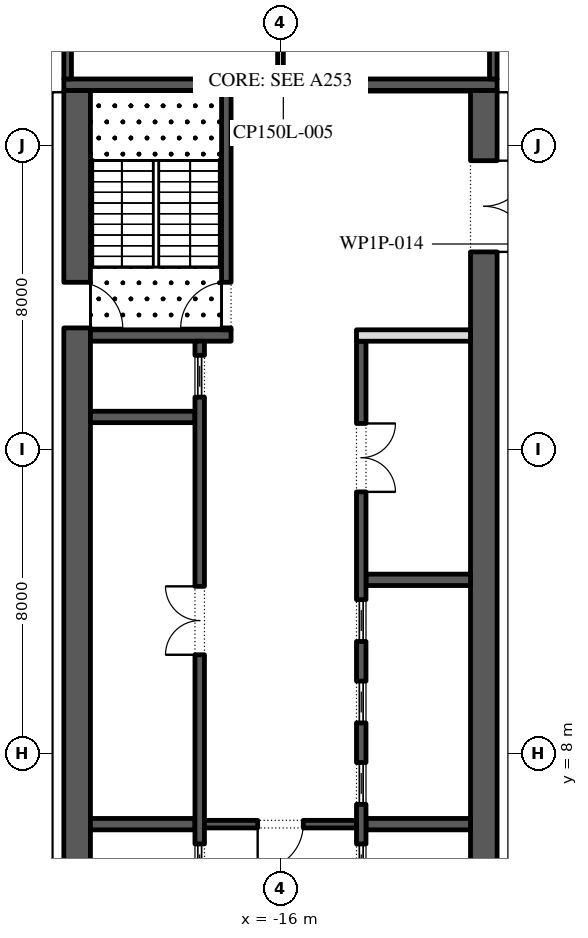
"""IFC4 building model, lengths in metres.
Left out: names, types, materials, properties, quantities, classifications, styles, units other than length and angle.
Written with IfcOpenShell. Run it as: python <this file> out.ifc"""

import sys

from ifc_helpers import new_model, si_unit, direction, frame, frame_2d, origin, place, context, subcontext, project, spatial, rectangle, extrude, element, fill, save


model = new_model("IFC4")
c1 = context("Model", 3, precision=1e-05, world=origin(), true_north=direction((0.0, 1.0)))
c2 = subcontext(c1, "Body", "Model", "MODEL_VIEW")
j1 = project(units=[si_unit("LENGTHUNIT", "METRE"), si_unit("PLANEANGLEUNIT", "RADIAN")], contexts=[c1])
p1 = place(None, origin())
s1 = spatial("IfcSite", under=j1, at=p1, CompositionType="ELEMENT")
p2 = place(p1, origin())
s2 = spatial("IfcBuilding", under=s1, at=p2, CompositionType="ELEMENT")
p3 = place(p2, frame((0.0, 0.0, 226.2)))
s3 = spatial("IfcBuildingStorey", under=s2, at=p3, CompositionType="ELEMENT", Elevation=226.2)
p4 = place(p3, frame((-21.35, -2.45, 0.0), z_axis=(0.0, 0.0, 1.0), x_axis=(0.0, 1.0, 0.0)))
e1 = element("IfcWall", 1, at=p4, inside=s3, PredefinedType="SHEAR", context=c2, shape_type="SweptSolid", body=[
    extrude(rectangle(XDim=27.9, YDim=0.7, at=frame_2d((13.95, 0.0))), origin(), (0.0, 0.0, 1.0), 10.35),
])
p5 = place(p4, frame((5.05, 0.0, 0.0)))
e2 = element("IfcOpeningElement", 2, at=p5, cuts=e1, PredefinedType="OPENING", context=c2, shape_type="SweptSolid", body=[
    extrude(rectangle(XDim=1.2, YDim=2.1, at=frame_2d((0.6, 1.05))), frame((0.0, 0.36, 0.0), z_axis=(0.0, -1.0, 0.0), x_axis=(1.0, 0.0, 0.0)), (0.0, 0.0, 1.0), 0.72),
])
p6 = place(p4, frame((21.65, 0.0, 0.0)))
e3 = element("IfcOpeningElement", 3, at=p6, cuts=e1, PredefinedType="OPENING", context=c2, shape_type="SweptSolid", body=[
    extrude(rectangle(XDim=1.2, YDim=2.1, at=frame_2d((0.6, 1.05))), frame((0.0, 0.36, 0.0), z_axis=(0.0, -1.0, 0.0), x_axis=(1.0, 0.0, 0.0)), (0.0, 0.0, 1.0), 0.72),
])
p7 = place(p3, frame((-10.65, -2.45, 0.0), z_axis=(0.0, 0.0, 1.0), x_axis=(0.0, 1.0, 0.0)))
e4 = element("IfcWall", 4, at=p7, inside=s3, PredefinedType="SHEAR", context=c2, shape_type="SweptSolid", body=[
    extrude(rectangle(XDim=27.9, YDim=0.7, at=frame_2d((13.95, 0.0))), origin(), (0.0, 0.0, 1.0), 10.35),
])
p8 = place(p7, frame((23.65, 0.0, 0.0)))
e5 = element("IfcOpeningElement", 5, at=p8, cuts=e4, PredefinedType="OPENING", context=c2, shape_type="SweptSolid", body=[
    extrude(rectangle(XDim=2.4, YDim=2.1, at=frame_2d((1.2, 1.05))), frame((0.0, 0.36, 0.0), z_axis=(0.0, -1.0, 0.0), x_axis=(1.0, 0.0, 0.0)), (0.0, 0.0, 1.0), 0.72),
])
p9 = place(p7, frame((2.25, 0.0, 0.0)))
e6 = element("IfcOpeningElement", 6, at=p9, cuts=e4, PredefinedType="OPENING", context=c2, shape_type="SweptSolid", body=[
    extrude(rectangle(XDim=1.8, YDim=2.4, at=frame_2d((0.9, 1.2))), frame((0.0, 0.36, 0.0), z_axis=(0.0, -1.0, 0.0), x_axis=(1.0, 0.0, 0.0)), (0.0, 0.0, 1.0), 0.72),
])
p10 = place(p3, frame((-21.7, 25.6, 0.0), z_axis=(0.0, 0.0, 1.0), x_axis=(1.0, 0.0, 0.0)))
e7 = element("IfcWall", 7, at=p10, inside=s3, PredefinedType="SHEAR", context=c2, shape_type="SweptSolid", body=[
    extrude(rectangle(XDim=11.4, YDim=0.3, at=frame_2d((5.7, 0.0))), origin(), (0.0, 0.0, 1.0), 10.35),
])
p11 = place(p3, frame((-21.0, 19.0, 0.0), z_axis=(0.0, 0.0, 1.0), x_axis=(1.0, 0.0, 0.0)))
e8 = element("IfcWall", 8, at=p11, inside=s3, PredefinedType="SHEAR", context=c2, shape_type="SweptSolid", body=[
    extrude(rectangle(XDim=3.7, YDim=0.3, at=frame_2d((1.85, 0.0))), origin(), (0.0, 0.0, 1.0), 10.35),
])
p12 = place(p3, frame((-17.425, 19.15, 0.0), z_axis=(0.0, 0.0, 1.0), x_axis=(0.0, 1.0, 0.0)))
e9 = element("IfcWall", 9, at=p12, inside=s3, PredefinedType="SHEAR", context=c2, shape_type="SweptSolid", body=[
    extrude(rectangle(XDim=6.3, YDim=0.25, at=frame_2d((3.15, 0.0))), origin(), (0.0, 0.0, 1.0), 10.35),
])
p13 = place(p12, frame((0.05, 0.0, 0.0)))
e10 = element("IfcOpeningElement", 10, at=p13, cuts=e9, PredefinedType="OPENING", context=c2, shape_type="SweptSolid", body=[
    extrude(rectangle(XDim=1.2, YDim=2.1, at=frame_2d((0.6, 1.05))), frame((0.0, 0.135, 0.0), z_axis=(0.0, -1.0, 0.0), x_axis=(1.0, 0.0, 0.0)), (0.0, 0.0, 1.0), 0.27),
])
for number, where, z_axis, x_axis in (
    (11, (-21.0, 6.143, 0.0), (0.0, 0.0, 1.0), (1.0, 0.0, 0.0)),
    (12, (-21.0, 16.857, 0.0), (0.0, 0.0, 1.0), (1.0, 0.0, 0.0)),
):
    element("IfcWall", number, at=place(p3, frame(where, z_axis=z_axis, x_axis=x_axis)), inside=s3, PredefinedType="SHEAR", context=c2, shape_type="SweptSolid", body=[
        extrude(rectangle(XDim=2.75, YDim=0.3, at=frame_2d((1.375, 0.0))), origin(), (0.0, 0.0, 1.0), 10.35),
    ])
p14 = place(p3, frame((-18.125, 4.15, 0.0), z_axis=(0.0, 0.0, 1.0), x_axis=(0.0, 1.0, 0.0)))
e13 = element("IfcWall", 13, at=p14, inside=s3, PredefinedType="SHEAR", context=c2, shape_type="SweptSolid", body=[
    extrude(rectangle(XDim=14.7, YDim=0.25, at=frame_2d((7.35, 0.0))), origin(), (0.0, 0.0, 1.0), 10.35),
])
p15 = place(p14, frame((6.45, 0.0, 0.0)))
e14 = element("IfcOpeningElement", 14, at=p15, cuts=e13, PredefinedType="OPENING", context=c2, shape_type="SweptSolid", body=[
    extrude(rectangle(XDim=1.8, YDim=2.4, at=frame_2d((0.9, 1.2))), frame((0.0, 0.135, 0.0), z_axis=(0.0, -1.0, 0.0), x_axis=(1.0, 0.0, 0.0)), (0.0, 0.0, 1.0), 0.27),
])
p16 = place(p14, frame((0.371, 0.0, 0.0)))
e15 = element("IfcOpeningElement", 15, at=p16, cuts=e13, PredefinedType="OPENING", context=c2, shape_type="SweptSolid", body=[
    extrude(rectangle(XDim=1.1, YDim=2.1, at=frame_2d((0.55, 1.05))), frame((0.0, 0.135, 0.0), z_axis=(0.0, -1.0, 0.0), x_axis=(1.0, 0.0, 0.0)), (0.0, 0.0, 1.0), 0.27),
])
p17 = place(p14, frame((13.229, 0.0, 0.0)))
e16 = element("IfcOpeningElement", 16, at=p17, cuts=e13, PredefinedType="OPENING", context=c2, shape_type="SweptSolid", body=[
    extrude(rectangle(XDim=1.1, YDim=2.1, at=frame_2d((0.55, 1.05))), frame((0.0, 0.135, 0.0), z_axis=(0.0, -1.0, 0.0), x_axis=(1.0, 0.0, 0.0)), (0.0, 0.0, 1.0), 0.27),
])
for number, where, z_axis, x_axis in (
    (17, (-13.75, 6.143, 0.0), (0.0, 0.0, 1.0), (1.0, 0.0, 0.0)),
    (18, (-13.75, 12.571, 0.0), (0.0, 0.0, 1.0), (1.0, 0.0, 0.0)),
):
    element("IfcWall", number, at=place(p3, frame(where, z_axis=z_axis, x_axis=x_axis)), inside=s3, PredefinedType="SHEAR", context=c2, shape_type="SweptSolid", body=[
        extrude(rectangle(XDim=2.75, YDim=0.3, at=frame_2d((1.375, 0.0))), origin(), (0.0, 0.0, 1.0), 10.35),
    ])
p18 = place(p3, frame((-13.875, -2.45, 0.0), z_axis=(0.0, 0.0, 1.0), x_axis=(0.0, 1.0, 0.0)))
e19 = element("IfcWall", 19, at=p18, inside=s3, PredefinedType="SHEAR", context=c2, shape_type="SweptSolid", body=[
    extrude(rectangle(XDim=21.3, YDim=0.25, at=frame_2d((10.65, 0.0))), origin(), (0.0, 0.0, 1.0), 10.35),
])
p19 = place(p18, frame((17.336, 0.0, 0.0)))
e20 = element("IfcOpeningElement", 20, at=p19, cuts=e19, PredefinedType="OPENING", context=c2, shape_type="SweptSolid", body=[
    extrude(rectangle(XDim=1.8, YDim=2.4, at=frame_2d((0.9, 1.2))), frame((0.0, 0.135, 0.0), z_axis=(0.0, -1.0, 0.0), x_axis=(1.0, 0.0, 0.0)), (0.0, 0.0, 1.0), 0.27),
])
p20 = place(p18, frame((6.971, 0.0, 0.0)))
e21 = element("IfcOpeningElement", 21, at=p20, cuts=e19, PredefinedType="OPENING", context=c2, shape_type="SweptSolid", body=[
    extrude(rectangle(XDim=1.1, YDim=2.1, at=frame_2d((0.55, 1.05))), frame((0.0, 0.135, 0.0), z_axis=(0.0, -1.0, 0.0), x_axis=(1.0, 0.0, 0.0)), (0.0, 0.0, 1.0), 0.27),
])
p21 = place(p18, frame((9.114, 0.0, 0.0)))
e22 = element("IfcOpeningElement", 22, at=p21, cuts=e19, PredefinedType="OPENING", context=c2, shape_type="SweptSolid", body=[
    extrude(rectangle(XDim=1.1, YDim=2.1, at=frame_2d((0.55, 1.05))), frame((0.0, 0.135, 0.0), z_axis=(0.0, -1.0, 0.0), x_axis=(1.0, 0.0, 0.0)), (0.0, 0.0, 1.0), 0.27),
])
p22 = place(p18, frame((11.257, 0.0, 0.0)))
e23 = element("IfcOpeningElement", 23, at=p22, cuts=e19, PredefinedType="OPENING", context=c2, shape_type="SweptSolid", body=[
    extrude(rectangle(XDim=1.1, YDim=2.1, at=frame_2d((0.55, 1.05))), frame((0.0, 0.135, 0.0), z_axis=(0.0, -1.0, 0.0), x_axis=(1.0, 0.0, 0.0)), (0.0, 0.0, 1.0), 0.27),
])
p23 = place(p18, frame((13.4, 0.0, 0.0)))
e24 = element("IfcOpeningElement", 24, at=p23, cuts=e19, PredefinedType="OPENING", context=c2, shape_type="SweptSolid", body=[
    extrude(rectangle(XDim=1.1, YDim=2.1, at=frame_2d((0.55, 1.05))), frame((0.0, 0.135, 0.0), z_axis=(0.0, -1.0, 0.0), x_axis=(1.0, 0.0, 0.0)), (0.0, 0.0, 1.0), 0.27),
])
p24 = place(p3, frame((-14.0, 19.0, 0.0), z_axis=(0.0, 0.0, 1.0), x_axis=(1.0, 0.0, 0.0)))
e25 = element("IfcWall", 25, at=p24, inside=s3, PredefinedType="PARTITIONING", context=c2, shape_type="SweptSolid", body=[
    extrude(rectangle(XDim=3.0, YDim=0.3, at=frame_2d((1.5, 0.0))), origin(), (0.0, 0.0, 1.0), 10.35),
])
p25 = place(p3, frame((-18.0, 6.143, 0.0), z_axis=(0.0, 0.0, 1.0), x_axis=(1.0, 0.0, 0.0)))
e26 = element("IfcWall", 26, at=p25, inside=s3, PredefinedType="SHEAR", context=c2, shape_type="SweptSolid", body=[
    extrude(rectangle(XDim=4.0, YDim=0.2, at=frame_2d((2.0, 0.0))), origin(), (0.0, 0.0, 1.0), 10.35),
])
p26 = place(p25, frame((1.4, 0.0, 0.0)))
e27 = element("IfcOpeningElement", 27, at=p26, cuts=e26, PredefinedType="OPENING", context=c2, shape_type="SweptSolid", body=[
    extrude(rectangle(XDim=1.2, YDim=2.1, at=frame_2d((0.6, 1.05))), frame((0.0, 0.11, 0.0), z_axis=(0.0, -1.0, 0.0), x_axis=(1.0, 0.0, 0.0)), (0.0, 0.0, 1.0), 0.22),
])
p27 = place(p3, frame((-21.6, 25.75, 0.0), z_axis=(0.0, 0.0, 1.0), x_axis=(0.0, 1.0, 0.0)))
e28 = element("IfcWall", 28, at=p27, inside=s3, PredefinedType="SHEAR", context=c2, shape_type="SweptSolid", body=[
    extrude(rectangle(XDim=4.75, YDim=0.2, at=frame_2d((2.375, 0.0))), origin(), (0.0, 0.0, 1.0), 10.35),
])
p28 = place(p27, frame((1.475, 0.0, 0.0)))
e29 = element("IfcOpeningElement", 29, at=p28, cuts=e28, PredefinedType="OPENING", context=c2, shape_type="SweptSolid", body=[
    extrude(rectangle(XDim=1.8, YDim=2.4, at=frame_2d((0.9, 1.2))), frame((0.0, 0.11, 0.0), z_axis=(0.0, -1.0, 0.0), x_axis=(1.0, 0.0, 0.0)), (0.0, 0.0, 1.0), 0.22),
])
p29 = place(p3, frame((-10.4, 25.75, 0.0), z_axis=(0.0, 0.0, 1.0), x_axis=(0.0, 1.0, 0.0)))
e30 = element("IfcWall", 30, at=p29, inside=s3, PredefinedType="SHEAR", context=c2, shape_type="SweptSolid", body=[
    extrude(rectangle(XDim=4.75, YDim=0.2, at=frame_2d((2.375, 0.0))), origin(), (0.0, 0.0, 1.0), 10.35),
])
p30 = place(p29, frame((1.475, 0.0, 0.0)))
e31 = element("IfcOpeningElement", 31, at=p30, cuts=e30, PredefinedType="OPENING", context=c2, shape_type="SweptSolid", body=[
    extrude(rectangle(XDim=1.8, YDim=2.4, at=frame_2d((0.9, 1.2))), frame((0.0, 0.11, 0.0), z_axis=(0.0, -1.0, 0.0), x_axis=(1.0, 0.0, 0.0)), (0.0, 0.0, 1.0), 0.22),
])
p31 = place(p3, frame((-16.0, 25.75, 0.0), z_axis=(0.0, 0.0, 1.0), x_axis=(0.0, 1.0, 0.0)))
e32 = element("IfcWall", 32, at=p31, inside=s3, PredefinedType="PARTITIONING", context=c2, shape_type="SweptSolid", body=[
    extrude(rectangle(XDim=4.75, YDim=0.15, at=frame_2d((2.375, 0.0))), origin(), (0.0, 0.0, 1.0), 10.35),
])
p32 = place(p15, origin())
e33 = element("IfcDoor", 33, at=p32, inside=s3, OperationType="DOUBLE_DOOR_SINGLE_SWING", PredefinedType="DOOR", context=c2, shape_type="SweptSolid", body=[
    extrude(rectangle(XDim=1.8, YDim=2.4, at=frame_2d((0.9, 1.2))), frame((0.0, 0.125, 0.0), z_axis=(0.0, -1.0, 0.0), x_axis=(1.0, 0.0, 0.0)), (0.0, 0.0, 1.0), 0.05),
])
fill(e14, e33)
p33 = place(p16, origin())
e34 = element("IfcDoor", 34, at=p33, inside=s3, OperationType="SLIDING_TO_LEFT", PredefinedType="DOOR", context=c2, shape_type="SweptSolid", body=[
    extrude(rectangle(XDim=1.1, YDim=2.1, at=frame_2d((0.55, 1.05))), frame((0.0, 0.025, 0.0), z_axis=(0.0, -1.0, 0.0), x_axis=(1.0, 0.0, 0.0)), (0.0, 0.0, 1.0), 0.05),
])
fill(e15, e34)
p34 = place(p17, origin())
e35 = element("IfcDoor", 35, at=p34, inside=s3, OperationType="SLIDING_TO_LEFT", PredefinedType="DOOR", context=c2, shape_type="SweptSolid", body=[
    extrude(rectangle(XDim=1.1, YDim=2.1, at=frame_2d((0.55, 1.05))), frame((0.0, 0.025, 0.0), z_axis=(0.0, -1.0, 0.0), x_axis=(1.0, 0.0, 0.0)), (0.0, 0.0, 1.0), 0.05),
])
fill(e16, e35)
p35 = place(p19, frame((1.8, -0.2, 0.0), z_axis=(0.0, 0.0, 1.0), x_axis=(-1.0, 0.0, 0.0)))
e36 = element("IfcDoor", 36, at=p35, inside=s3, OperationType="DOUBLE_DOOR_SINGLE_SWING", PredefinedType="DOOR", context=c2, shape_type="SweptSolid", body=[
    extrude(rectangle(XDim=1.8, YDim=2.4, at=frame_2d((0.9, 1.2))), frame((0.0, -0.075, 0.0), z_axis=(0.0, -1.0, 0.0), x_axis=(1.0, 0.0, 0.0)), (0.0, 0.0, 1.0), 0.05),
])
fill(e20, e36)
p36 = place(p20, origin())
e37 = element("IfcDoor", 37, at=p36, inside=s3, OperationType="SLIDING_TO_LEFT", PredefinedType="DOOR", context=c2, shape_type="SweptSolid", body=[
    extrude(rectangle(XDim=1.1, YDim=2.1, at=frame_2d((0.55, 1.05))), frame((0.0, 0.025, 0.0), z_axis=(0.0, -1.0, 0.0), x_axis=(1.0, 0.0, 0.0)), (0.0, 0.0, 1.0), 0.05),
])
fill(e21, e37)
p37 = place(p21, origin())
e38 = element("IfcDoor", 38, at=p37, inside=s3, OperationType="SLIDING_TO_LEFT", PredefinedType="DOOR", context=c2, shape_type="SweptSolid", body=[
    extrude(rectangle(XDim=1.1, YDim=2.1, at=frame_2d((0.55, 1.05))), frame((0.0, 0.025, 0.0), z_axis=(0.0, -1.0, 0.0), x_axis=(1.0, 0.0, 0.0)), (0.0, 0.0, 1.0), 0.05),
])
fill(e22, e38)
p38 = place(p22, origin())
e39 = element("IfcDoor", 39, at=p38, inside=s3, OperationType="SLIDING_TO_LEFT", PredefinedType="DOOR", context=c2, shape_type="SweptSolid", body=[
    extrude(rectangle(XDim=1.1, YDim=2.1, at=frame_2d((0.55, 1.05))), frame((0.0, 0.025, 0.0), z_axis=(0.0, -1.0, 0.0), x_axis=(1.0, 0.0, 0.0)), (0.0, 0.0, 1.0), 0.05),
])
fill(e23, e39)
p39 = place(p23, origin())
e40 = element("IfcDoor", 40, at=p39, inside=s3, OperationType="SLIDING_TO_LEFT", PredefinedType="DOOR", context=c2, shape_type="SweptSolid", body=[
    extrude(rectangle(XDim=1.1, YDim=2.1, at=frame_2d((0.55, 1.05))), frame((0.0, 0.025, 0.0), z_axis=(0.0, -1.0, 0.0), x_axis=(1.0, 0.0, 0.0)), (0.0, 0.0, 1.0), 0.05),
])
fill(e24, e40)
p40 = place(p26, frame((1.2, 0.0, 0.0), z_axis=(0.0, 0.0, 1.0), x_axis=(-1.0, 0.0, 0.0)))
e41 = element("IfcDoor", 41, at=p40, inside=s3, OperationType="SINGLE_SWING_LEFT", PredefinedType="DOOR", context=c2, shape_type="SweptSolid", body=[
    extrude(rectangle(XDim=1.2, YDim=2.1, at=frame_2d((0.6, 1.05))), frame((0.0, 0.025, 0.0), z_axis=(0.0, -1.0, 0.0), x_axis=(1.0, 0.0, 0.0)), (0.0, 0.0, 1.0), 0.05),
])
fill(e27, e41)
p41 = place(p8, frame((2.4, 0.0, 0.0), z_axis=(0.0, 0.0, 1.0), x_axis=(-1.0, 0.0, 0.0)))
e42 = element("IfcDoor", 42, at=p41, inside=s3, OperationType="DOUBLE_DOOR_SINGLE_SWING", PredefinedType="DOOR", context=c2, shape_type="SweptSolid", body=[
    extrude(rectangle(XDim=2.4, YDim=2.1, at=frame_2d((1.2, 1.05))), frame((0.0, 0.025, 0.0), z_axis=(0.0, -1.0, 0.0), x_axis=(1.0, 0.0, 0.0)), (0.0, 0.0, 1.0), 0.05),
])
fill(e5, e42)
p42 = place(p13, origin())
e43 = element("IfcDoor", 43, at=p42, inside=s3, OperationType="SINGLE_SWING_RIGHT", PredefinedType="DOOR", context=c2, shape_type="SweptSolid", body=[
    extrude(rectangle(XDim=1.2, YDim=2.1, at=frame_2d((0.6, 1.05))), frame((0.0, 0.025, 0.0), z_axis=(0.0, -1.0, 0.0), x_axis=(1.0, 0.0, 0.0)), (0.0, 0.0, 1.0), 0.05),
])
fill(e10, e43)
p43 = place(p6, frame((1.2, 0.0, 0.0), z_axis=(0.0, 0.0, 1.0), x_axis=(-1.0, 0.0, 0.0)))
e44 = element("IfcDoor", 44, at=p43, inside=s3, OperationType="SINGLE_SWING_LEFT", PredefinedType="DOOR", context=c2, shape_type="SweptSolid", body=[
    extrude(rectangle(XDim=1.2, YDim=2.1, at=frame_2d((0.6, 1.05))), frame((0.0, 0.025, 0.0), z_axis=(0.0, -1.0, 0.0), x_axis=(1.0, 0.0, 0.0)), (0.0, 0.0, 1.0), 0.05),
])
fill(e3, e44)
save(model, sys.argv[1])
